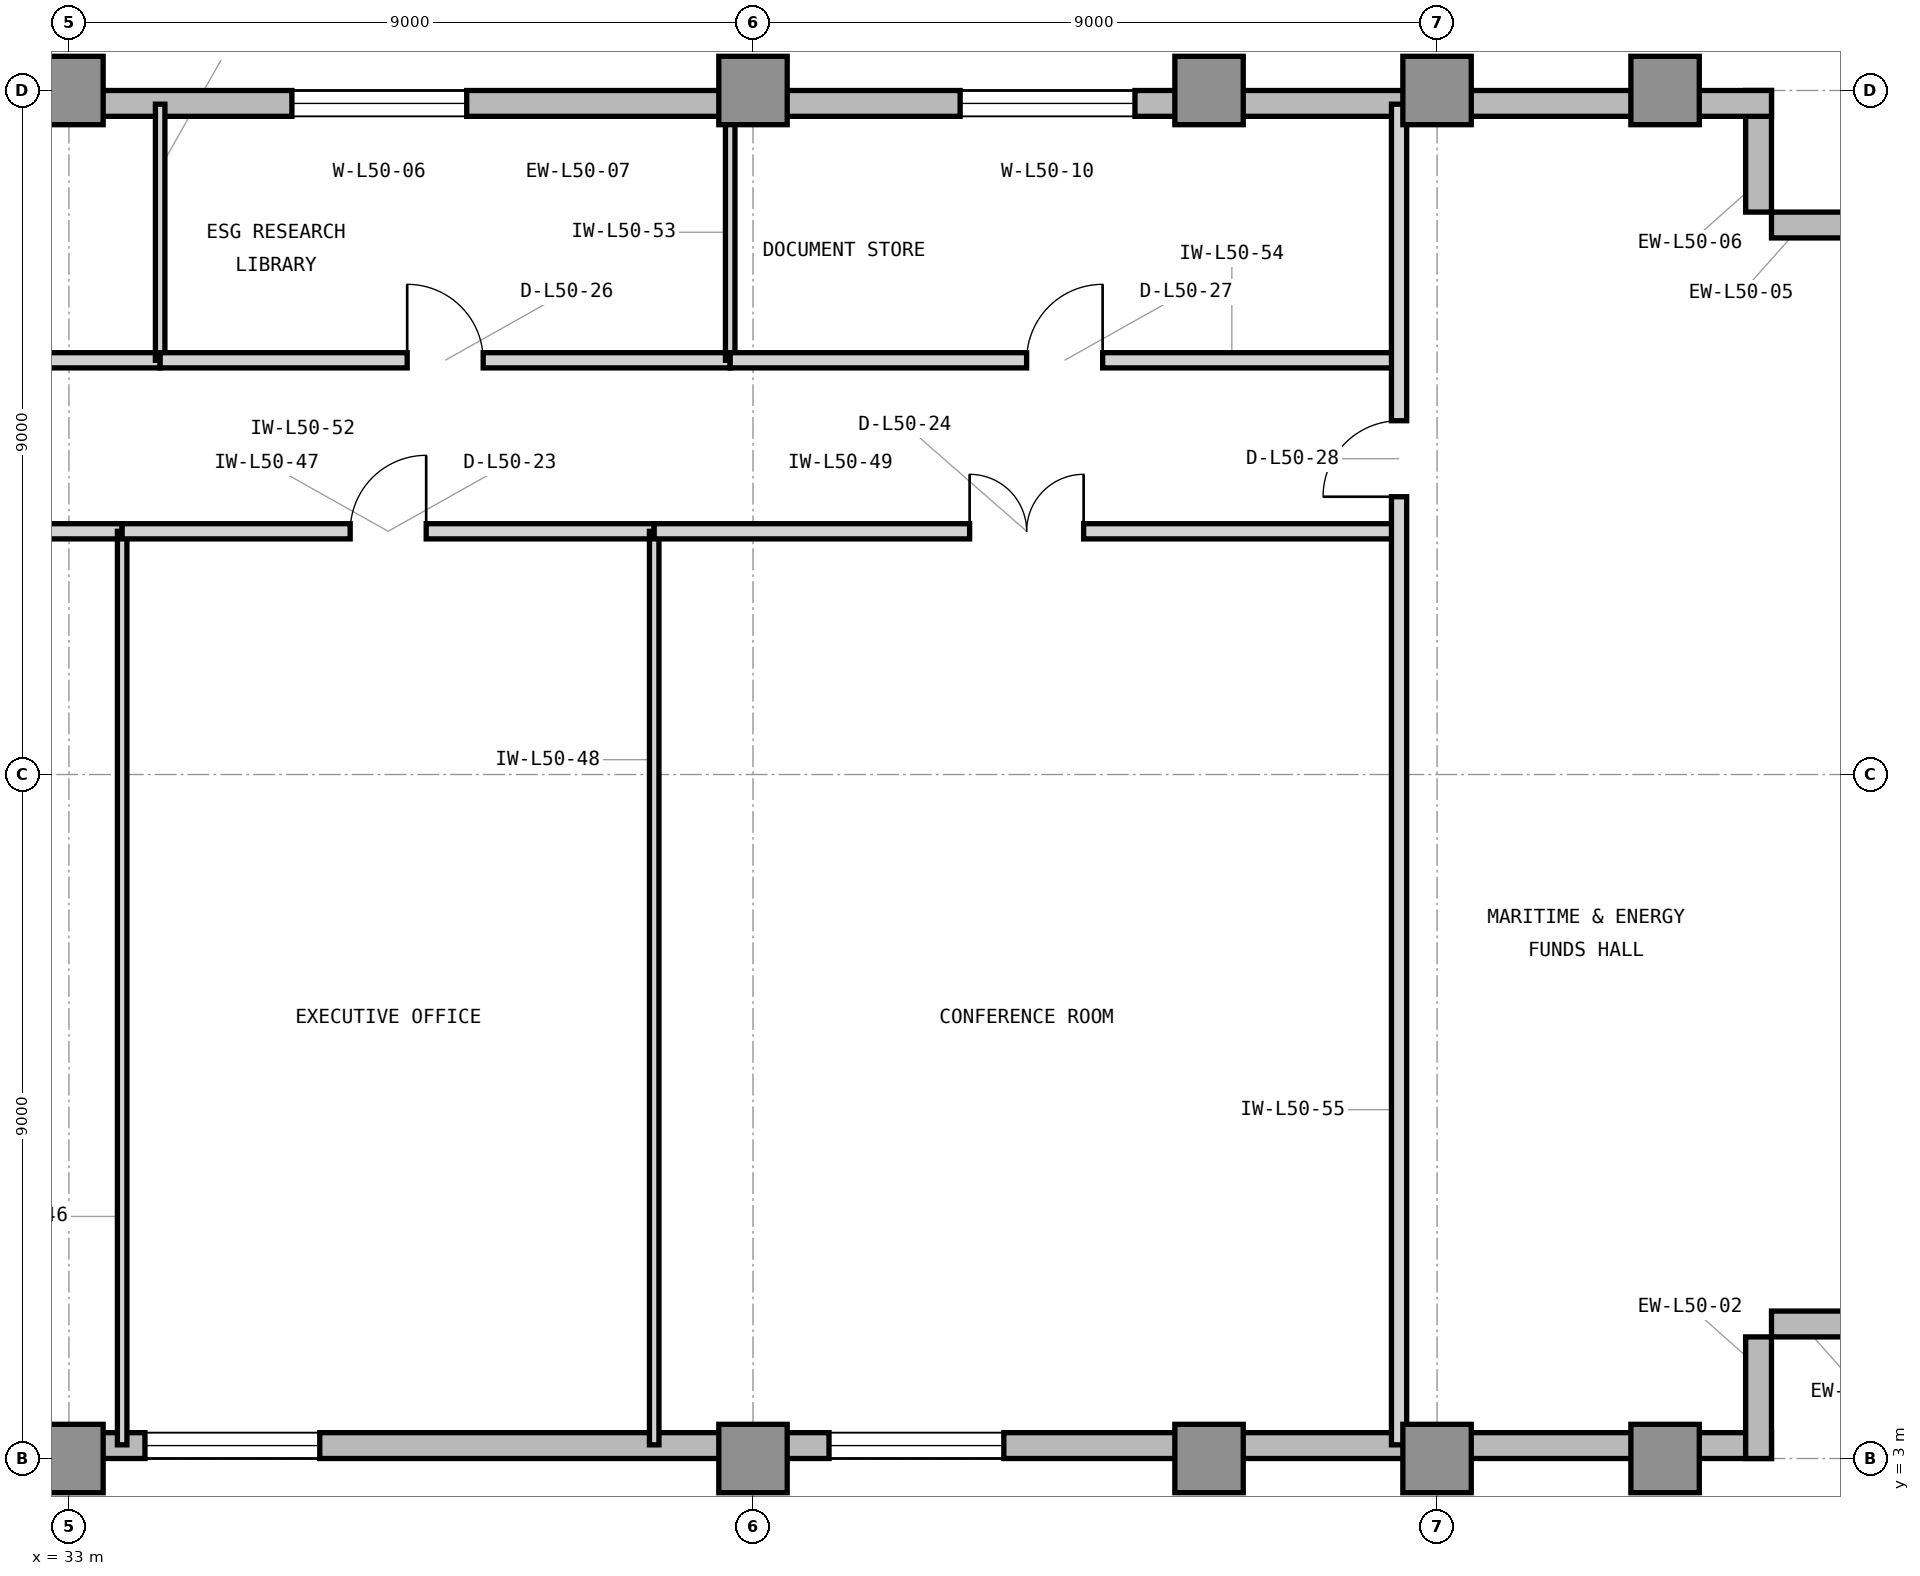
"""IFC4 building model, lengths in metres.
Left out: names, types, materials, properties, quantities, classifications, styles, units other than length and angle.
Written with IfcOpenShell. Run it as: python <this file> out.ifc"""

import sys

from ifc_helpers import new_model, si_unit, direction, frame, frame_2d, origin, origin_2d, place, context, subcontext, project, spatial, rectangle, extrude, element, fill, save


model = new_model("IFC4")
c1 = context("Model", 3, precision=1e-05, world=origin(), true_north=direction((0.0, 1.0)))
c2 = subcontext(c1, "Body", "Model", "MODEL_VIEW")
j1 = project(units=[si_unit("LENGTHUNIT", "METRE"), si_unit("PLANEANGLEUNIT", "RADIAN")], contexts=[c1])
p1 = place(None, origin())
s1 = spatial("IfcSite", under=j1, at=p1, CompositionType="ELEMENT")
p2 = place(p1, origin())
s2 = spatial("IfcBuilding", under=s1, at=p2, CompositionType="ELEMENT")
p3 = place(p2, frame((0.0, 0.0, 207.3)))
s3 = spatial("IfcBuildingStorey", under=s2, at=p3, CompositionType="ELEMENT", Elevation=207.3)
for number, where, z_axis, x_axis in (
    (1, (33.0, 3.0, 0.0), (0.0, 0.0, 1.0), (1.0, 0.0, 0.0)),
    (2, (33.0, 21.0, 0.0), (0.0, 0.0, 1.0), (1.0, 0.0, 0.0)),
    (3, (42.0, 3.0, 0.0), (0.0, 0.0, 1.0), (1.0, 0.0, 0.0)),
    (4, (42.0, 21.0, 0.0), (0.0, 0.0, 1.0), (1.0, 0.0, 0.0)),
    (5, (48.0, 3.0, 0.0), (0.0, 0.0, 1.0), (1.0, 0.0, 0.0)),
    (6, (48.0, 21.0, 0.0), (0.0, 0.0, 1.0), (1.0, 0.0, 0.0)),
    (7, (51.0, 3.0, 0.0), (0.0, 0.0, 1.0), (1.0, 0.0, 0.0)),
    (8, (51.0, 21.0, 0.0), (0.0, 0.0, 1.0), (1.0, 0.0, 0.0)),
    (9, (54.0, 3.0, 0.0), (0.0, 0.0, 1.0), (1.0, 0.0, 0.0)),
    (10, (54.0, 21.0, 0.0), (0.0, 0.0, 1.0), (1.0, 0.0, 0.0)),
):
    element("IfcColumn", number, at=place(p3, frame(where, z_axis=z_axis, x_axis=x_axis)), inside=s3, PredefinedType="COLUMN", context=c2, shape_type="SweptSolid", body=[
        extrude(rectangle(XDim=0.9, YDim=0.9, at=origin_2d()), origin(), (0.0, 0.0, 1.0), 3.9),
    ])
p4 = place(p3, frame((23.9, 3.17, 0.0), z_axis=(0.0, 0.0, 1.0), x_axis=(1.0, 0.0, 0.0)))
e11 = element("IfcWall", 11, at=p4, inside=s3, PredefinedType="STANDARD", context=c2, shape_type="SweptSolid", body=[
    extrude(rectangle(XDim=31.5, YDim=0.34, at=frame_2d((15.75, 0.0))), origin(), (0.0, 0.0, 1.0), 3.7),
])
p5 = place(p4, frame((5.6, 0.0, 0.9)))
e12 = element("IfcOpeningElement", 12, at=p5, cuts=e11, PredefinedType="OPENING", context=c2, shape_type="SweptSolid", body=[
    extrude(rectangle(XDim=2.3, YDim=2.2, at=frame_2d((1.15, 1.1))), frame((0.0, 0.18, 0.0), z_axis=(0.0, -1.0, 0.0), x_axis=(1.0, 0.0, 0.0)), (0.0, 0.0, 1.0), 0.36),
])
p6 = place(p4, frame((10.1, 0.0, 0.9)))
e13 = element("IfcOpeningElement", 13, at=p6, cuts=e11, PredefinedType="OPENING", context=c2, shape_type="SweptSolid", body=[
    extrude(rectangle(XDim=2.3, YDim=2.2, at=frame_2d((1.15, 1.1))), frame((0.0, 0.18, 0.0), z_axis=(0.0, -1.0, 0.0), x_axis=(1.0, 0.0, 0.0)), (0.0, 0.0, 1.0), 0.36),
])
p7 = place(p4, frame((19.1, 0.0, 0.9)))
e14 = element("IfcOpeningElement", 14, at=p7, cuts=e11, PredefinedType="OPENING", context=c2, shape_type="SweptSolid", body=[
    extrude(rectangle(XDim=2.3, YDim=2.2, at=frame_2d((1.15, 1.1))), frame((0.0, 0.18, 0.0), z_axis=(0.0, -1.0, 0.0), x_axis=(1.0, 0.0, 0.0)), (0.0, 0.0, 1.0), 0.36),
])
p8 = place(p4, frame((0.9, 0.0, 0.9)))
e15 = element("IfcOpeningElement", 15, at=p8, cuts=e11, PredefinedType="OPENING", context=c2, shape_type="SweptSolid", body=[
    extrude(rectangle(XDim=1.6, YDim=2.2, at=frame_2d((0.8, 1.1))), frame((0.0, 0.18, 0.0), z_axis=(0.0, -1.0, 0.0), x_axis=(1.0, 0.0, 0.0)), (0.0, 0.0, 1.0), 0.36),
])
for number, where, z_axis, x_axis in (
    (16, (55.23, 3.0, 0.0), (0.0, 0.0, 1.0), (0.0, 1.0, 0.0)),
    (17, (55.4, 4.77, 0.0), (0.0, 0.0, 1.0), (1.0, 0.0, 0.0)),
    (18, (57.0, 19.23, 0.0), (0.0, 0.0, 1.0), (-1.0, 0.0, 0.0)),
    (19, (55.23, 19.4, 0.0), (0.0, 0.0, 1.0), (0.0, 1.0, 0.0)),
):
    element("IfcWall", number, at=place(p3, frame(where, z_axis=z_axis, x_axis=x_axis)), inside=s3, PredefinedType="STANDARD", context=c2, shape_type="SweptSolid", body=[
        extrude(rectangle(XDim=1.6, YDim=0.34, at=frame_2d((0.8, 0.0))), origin(), (0.0, 0.0, 1.0), 3.7),
    ])
p9 = place(p3, frame((55.4, 20.83, 0.0), z_axis=(0.0, 0.0, 1.0), x_axis=(-1.0, 0.0, 0.0)))
e20 = element("IfcWall", 20, at=p9, inside=s3, PredefinedType="STANDARD", context=c2, shape_type="SweptSolid", body=[
    extrude(rectangle(XDim=31.4, YDim=0.34, at=frame_2d((15.7, 0.0))), origin(), (0.0, 0.0, 1.0), 3.7),
])
p10 = place(p9, frame((17.167, 0.0, 0.9)))
e21 = element("IfcOpeningElement", 21, at=p10, cuts=e20, PredefinedType="OPENING", context=c2, shape_type="SweptSolid", body=[
    extrude(rectangle(XDim=2.3, YDim=2.2, at=frame_2d((1.15, 1.1))), frame((0.0, 0.18, 0.0), z_axis=(0.0, -1.0, 0.0), x_axis=(1.0, 0.0, 0.0)), (0.0, 0.0, 1.0), 0.36),
])
p11 = place(p9, frame((23.825, 0.0, 0.9)))
e22 = element("IfcOpeningElement", 22, at=p11, cuts=e20, PredefinedType="OPENING", context=c2, shape_type="SweptSolid", body=[
    extrude(rectangle(XDim=2.3, YDim=2.2, at=frame_2d((1.15, 1.1))), frame((0.0, 0.18, 0.0), z_axis=(0.0, -1.0, 0.0), x_axis=(1.0, 0.0, 0.0)), (0.0, 0.0, 1.0), 0.36),
])
p12 = place(p9, frame((8.375, 0.0, 0.9)))
e23 = element("IfcOpeningElement", 23, at=p12, cuts=e20, PredefinedType="OPENING", context=c2, shape_type="SweptSolid", body=[
    extrude(rectangle(XDim=2.3, YDim=2.2, at=frame_2d((1.15, 1.1))), frame((0.0, 0.18, 0.0), z_axis=(0.0, -1.0, 0.0), x_axis=(1.0, 0.0, 0.0)), (0.0, 0.0, 1.0), 0.36),
])
p13 = place(p3, frame((26.7, 15.2, 0.0), z_axis=(0.0, 0.0, 1.0), x_axis=(1.0, 0.0, 0.0)))
e24 = element("IfcWall", 24, at=p13, inside=s3, PredefinedType="PARTITIONING", context=c2, shape_type="SweptSolid", body=[
    extrude(rectangle(XDim=7.0, YDim=0.2, at=frame_2d((3.5, 0.0))), origin(), (0.0, 0.0, 1.0), 3.69),
])
p14 = place(p13, frame((2.5, 0.0, 0.0)))
e25 = element("IfcOpeningElement", 25, at=p14, cuts=e24, PredefinedType="OPENING", context=c2, shape_type="SweptSolid", body=[
    extrude(rectangle(XDim=2.0, YDim=2.5, at=frame_2d((1.0, 1.25))), frame((0.0, 0.11, 0.0), z_axis=(0.0, -1.0, 0.0), x_axis=(1.0, 0.0, 0.0)), (0.0, 0.0, 1.0), 0.22),
])
p15 = place(p3, frame((33.7, 3.18, 0.0), z_axis=(0.0, 0.0, 1.0), x_axis=(0.0, 1.0, 0.0)))
e26 = element("IfcWall", 26, at=p15, inside=s3, PredefinedType="PARTITIONING", context=c2, shape_type="SweptSolid", body=[
    extrude(rectangle(XDim=12.02, YDim=0.125, at=frame_2d((6.01, 0.0))), origin(), (0.0, 0.0, 1.0), 3.69),
])
p16 = place(p3, frame((33.7, 15.2, 0.0), z_axis=(0.0, 0.0, 1.0), x_axis=(1.0, 0.0, 0.0)))
e27 = element("IfcWall", 27, at=p16, inside=s3, PredefinedType="PARTITIONING", context=c2, shape_type="SweptSolid", body=[
    extrude(rectangle(XDim=7.0, YDim=0.2, at=frame_2d((3.5, 0.0))), origin(), (0.0, 0.0, 1.0), 3.69),
])
p17 = place(p16, frame((3.0, 0.0, 0.0)))
e28 = element("IfcOpeningElement", 28, at=p17, cuts=e27, PredefinedType="OPENING", context=c2, shape_type="SweptSolid", body=[
    extrude(rectangle(XDim=1.0, YDim=2.15, at=frame_2d((0.5, 1.075))), frame((0.0, 0.11, 0.0), z_axis=(0.0, -1.0, 0.0), x_axis=(1.0, 0.0, 0.0)), (0.0, 0.0, 1.0), 0.22),
])
p18 = place(p3, frame((40.7, 3.18, 0.0), z_axis=(0.0, 0.0, 1.0), x_axis=(0.0, 1.0, 0.0)))
e29 = element("IfcWall", 29, at=p18, inside=s3, PredefinedType="PARTITIONING", context=c2, shape_type="SweptSolid", body=[
    extrude(rectangle(XDim=12.02, YDim=0.125, at=frame_2d((6.01, 0.0))), origin(), (0.0, 0.0, 1.0), 3.69),
])
p19 = place(p3, frame((40.7, 15.2, 0.0), z_axis=(0.0, 0.0, 1.0), x_axis=(1.0, 0.0, 0.0)))
e30 = element("IfcWall", 30, at=p19, inside=s3, PredefinedType="PARTITIONING", context=c2, shape_type="SweptSolid", body=[
    extrude(rectangle(XDim=9.8, YDim=0.2, at=frame_2d((4.9, 0.0))), origin(), (0.0, 0.0, 1.0), 3.69),
])
p20 = place(p19, frame((4.15, 0.0, 0.0)))
e31 = element("IfcOpeningElement", 31, at=p20, cuts=e30, PredefinedType="OPENING", context=c2, shape_type="SweptSolid", body=[
    extrude(rectangle(XDim=1.5, YDim=2.3, at=frame_2d((0.75, 1.15))), frame((0.0, 0.11, 0.0), z_axis=(0.0, -1.0, 0.0), x_axis=(1.0, 0.0, 0.0)), (0.0, 0.0, 1.0), 0.22),
])
p21 = place(p3, frame((26.7, 17.45, 0.0), z_axis=(0.0, 0.0, 1.0), x_axis=(1.0, 0.0, 0.0)))
e32 = element("IfcWall", 32, at=p21, inside=s3, PredefinedType="PARTITIONING", context=c2, shape_type="SweptSolid", body=[
    extrude(rectangle(XDim=7.5, YDim=0.2, at=frame_2d((3.75, 0.0))), origin(), (0.0, 0.0, 1.0), 3.69),
])
p22 = place(p21, frame((3.0, 0.0, 0.0)))
e33 = element("IfcOpeningElement", 33, at=p22, cuts=e32, PredefinedType="OPENING", context=c2, shape_type="SweptSolid", body=[
    extrude(rectangle(XDim=1.5, YDim=2.3, at=frame_2d((0.75, 1.15))), frame((0.0, 0.11, 0.0), z_axis=(0.0, -1.0, 0.0), x_axis=(1.0, 0.0, 0.0)), (0.0, 0.0, 1.0), 0.22),
])
p23 = place(p3, frame((34.2, 17.45, 0.0), z_axis=(0.0, 0.0, 1.0), x_axis=(0.0, 1.0, 0.0)))
e34 = element("IfcWall", 34, at=p23, inside=s3, PredefinedType="PARTITIONING", context=c2, shape_type="SweptSolid", body=[
    extrude(rectangle(XDim=3.37, YDim=0.125, at=frame_2d((1.685, 0.0))), origin(), (0.0, 0.0, 1.0), 3.69),
])
p24 = place(p3, frame((34.2, 17.45, 0.0), z_axis=(0.0, 0.0, 1.0), x_axis=(1.0, 0.0, 0.0)))
e35 = element("IfcWall", 35, at=p24, inside=s3, PredefinedType="PARTITIONING", context=c2, shape_type="SweptSolid", body=[
    extrude(rectangle(XDim=7.5, YDim=0.2, at=frame_2d((3.75, 0.0))), origin(), (0.0, 0.0, 1.0), 3.69),
])
p25 = place(p24, frame((3.25, 0.0, 0.0)))
e36 = element("IfcOpeningElement", 36, at=p25, cuts=e35, PredefinedType="OPENING", context=c2, shape_type="SweptSolid", body=[
    extrude(rectangle(XDim=1.0, YDim=2.15, at=frame_2d((0.5, 1.075))), frame((0.0, 0.11, 0.0), z_axis=(0.0, -1.0, 0.0), x_axis=(1.0, 0.0, 0.0)), (0.0, 0.0, 1.0), 0.22),
])
p26 = place(p3, frame((41.7, 17.45, 0.0), z_axis=(0.0, 0.0, 1.0), x_axis=(0.0, 1.0, 0.0)))
e37 = element("IfcWall", 37, at=p26, inside=s3, PredefinedType="PARTITIONING", context=c2, shape_type="SweptSolid", body=[
    extrude(rectangle(XDim=3.37, YDim=0.125, at=frame_2d((1.685, 0.0))), origin(), (0.0, 0.0, 1.0), 3.69),
])
p27 = place(p3, frame((41.7, 17.45, 0.0), z_axis=(0.0, 0.0, 1.0), x_axis=(1.0, 0.0, 0.0)))
e38 = element("IfcWall", 38, at=p27, inside=s3, PredefinedType="PARTITIONING", context=c2, shape_type="SweptSolid", body=[
    extrude(rectangle(XDim=8.8, YDim=0.2, at=frame_2d((4.4, 0.0))), origin(), (0.0, 0.0, 1.0), 3.69),
])
p28 = place(p27, frame((3.9, 0.0, 0.0)))
e39 = element("IfcOpeningElement", 39, at=p28, cuts=e38, PredefinedType="OPENING", context=c2, shape_type="SweptSolid", body=[
    extrude(rectangle(XDim=1.0, YDim=2.15, at=frame_2d((0.5, 1.075))), frame((0.0, 0.11, 0.0), z_axis=(0.0, -1.0, 0.0), x_axis=(1.0, 0.0, 0.0)), (0.0, 0.0, 1.0), 0.22),
])
p29 = place(p3, frame((50.5, 3.18, 0.0), z_axis=(0.0, 0.0, 1.0), x_axis=(0.0, 1.0, 0.0)))
e40 = element("IfcWall", 40, at=p29, inside=s3, PredefinedType="PARTITIONING", context=c2, shape_type="SweptSolid", body=[
    extrude(rectangle(XDim=17.64, YDim=0.2, at=frame_2d((8.82, 0.0))), origin(), (0.0, 0.0, 1.0), 3.69),
])
p30 = place(p29, frame((12.475, 0.0, 0.0)))
e41 = element("IfcOpeningElement", 41, at=p30, cuts=e40, PredefinedType="OPENING", context=c2, shape_type="SweptSolid", body=[
    extrude(rectangle(XDim=1.0, YDim=2.15, at=frame_2d((0.5, 1.075))), frame((0.0, 0.11, 0.0), z_axis=(0.0, -1.0, 0.0), x_axis=(1.0, 0.0, 0.0)), (0.0, 0.0, 1.0), 0.22),
])
p31 = place(p6, origin())
e42 = element("IfcWindow", 42, at=p31, inside=s3, PartitioningType="SINGLE_PANEL", PredefinedType="WINDOW", context=c2, shape_type="SweptSolid", body=[
    extrude(rectangle(XDim=2.3, YDim=2.2, at=frame_2d((1.15, 1.1))), frame((0.0, 0.11, 0.0), z_axis=(0.0, -1.0, 0.0), x_axis=(1.0, 0.0, 0.0)), (0.0, 0.0, 1.0), 0.06),
])
fill(e13, e42)
p32 = place(p7, origin())
e43 = element("IfcWindow", 43, at=p32, inside=s3, PartitioningType="SINGLE_PANEL", PredefinedType="WINDOW", context=c2, shape_type="SweptSolid", body=[
    extrude(rectangle(XDim=2.3, YDim=2.2, at=frame_2d((1.15, 1.1))), frame((0.0, 0.11, 0.0), z_axis=(0.0, -1.0, 0.0), x_axis=(1.0, 0.0, 0.0)), (0.0, 0.0, 1.0), 0.06),
])
fill(e14, e43)
p33 = place(p10, origin())
e44 = element("IfcWindow", 44, at=p33, inside=s3, PartitioningType="SINGLE_PANEL", PredefinedType="WINDOW", context=c2, shape_type="SweptSolid", body=[
    extrude(rectangle(XDim=2.3, YDim=2.2, at=frame_2d((1.15, 1.1))), frame((0.0, 0.11, 0.0), z_axis=(0.0, -1.0, 0.0), x_axis=(1.0, 0.0, 0.0)), (0.0, 0.0, 1.0), 0.06),
])
fill(e21, e44)
p34 = place(p17, origin())
e45 = element("IfcDoor", 45, at=p34, inside=s3, OperationType="SINGLE_SWING_RIGHT", PredefinedType="DOOR", context=c2, shape_type="SweptSolid", body=[
    extrude(rectangle(XDim=1.0, YDim=2.15, at=frame_2d((0.5, 1.075))), frame((0.0, 0.025, 0.0), z_axis=(0.0, -1.0, 0.0), x_axis=(1.0, 0.0, 0.0)), (0.0, 0.0, 1.0), 0.05),
])
fill(e28, e45)
p35 = place(p20, origin())
e46 = element("IfcDoor", 46, at=p35, inside=s3, OperationType="DOUBLE_DOOR_SINGLE_SWING", PredefinedType="DOOR", context=c2, shape_type="SweptSolid", body=[
    extrude(rectangle(XDim=1.5, YDim=2.3, at=frame_2d((0.75, 1.15))), frame((0.0, 0.025, 0.0), z_axis=(0.0, -1.0, 0.0), x_axis=(1.0, 0.0, 0.0)), (0.0, 0.0, 1.0), 0.05),
])
fill(e31, e46)
p36 = place(p25, origin())
e47 = element("IfcDoor", 47, at=p36, inside=s3, OperationType="SINGLE_SWING_LEFT", PredefinedType="DOOR", context=c2, shape_type="SweptSolid", body=[
    extrude(rectangle(XDim=1.0, YDim=2.15, at=frame_2d((0.5, 1.075))), frame((0.0, 0.025, 0.0), z_axis=(0.0, -1.0, 0.0), x_axis=(1.0, 0.0, 0.0)), (0.0, 0.0, 1.0), 0.05),
])
fill(e36, e47)
p37 = place(p28, origin())
e48 = element("IfcDoor", 48, at=p37, inside=s3, OperationType="SINGLE_SWING_RIGHT", PredefinedType="DOOR", context=c2, shape_type="SweptSolid", body=[
    extrude(rectangle(XDim=1.0, YDim=2.15, at=frame_2d((0.5, 1.075))), frame((0.0, 0.025, 0.0), z_axis=(0.0, -1.0, 0.0), x_axis=(1.0, 0.0, 0.0)), (0.0, 0.0, 1.0), 0.05),
])
fill(e39, e48)
p38 = place(p30, origin())
e49 = element("IfcDoor", 49, at=p38, inside=s3, OperationType="SINGLE_SWING_LEFT", PredefinedType="DOOR", context=c2, shape_type="SweptSolid", body=[
    extrude(rectangle(XDim=1.0, YDim=2.15, at=frame_2d((0.5, 1.075))), frame((0.0, 0.025, 0.0), z_axis=(0.0, -1.0, 0.0), x_axis=(1.0, 0.0, 0.0)), (0.0, 0.0, 1.0), 0.05),
])
fill(e41, e49)
p39 = place(p12, origin())
e50 = element("IfcWindow", 50, at=p39, inside=s3, PartitioningType="SINGLE_PANEL", PredefinedType="WINDOW", context=c2, shape_type="SweptSolid", body=[
    extrude(rectangle(XDim=2.3, YDim=2.2, at=frame_2d((1.15, 1.1))), frame((0.0, 0.11, 0.0), z_axis=(0.0, -1.0, 0.0), x_axis=(1.0, 0.0, 0.0)), (0.0, 0.0, 1.0), 0.06),
])
fill(e23, e50)
save(model, sys.argv[1])
